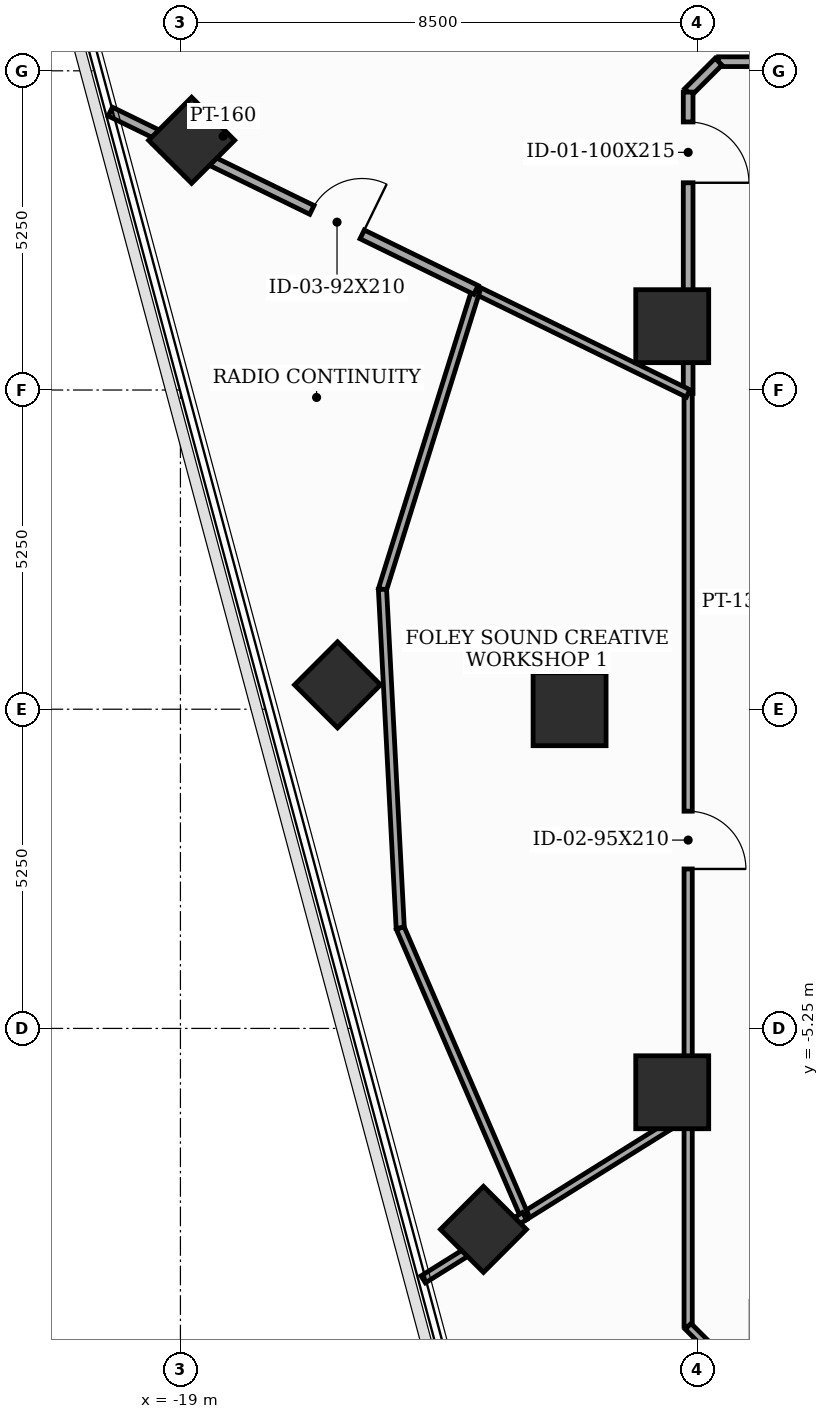
"""IFC4 building model, lengths in metres.
Left out: names, types, materials, properties, quantities, classifications, styles, units other than length and angle.
Written with IfcOpenShell. Run it as: python <this file> out.ifc"""

import sys

from ifc_helpers import new_model, si_unit, direction, frame, frame_2d, origin, origin_2d, place, context, subcontext, project, spatial, rectangle, extrude, element, fill, save


model = new_model("IFC4")
c1 = context("Model", 3, precision=1e-05, world=origin(), true_north=direction((0.0, 1.0)))
c2 = subcontext(c1, "Body", "Model", "MODEL_VIEW")
j1 = project(units=[si_unit("LENGTHUNIT", "METRE"), si_unit("PLANEANGLEUNIT", "RADIAN")], contexts=[c1])
p1 = place(None, origin())
s1 = spatial("IfcSite", under=j1, at=p1, CompositionType="ELEMENT")
p2 = place(p1, origin())
s2 = spatial("IfcBuilding", under=s1, at=p2, CompositionType="ELEMENT")
p3 = place(p2, frame((0.0, 0.0, 187.9)))
s3 = spatial("IfcBuildingStorey", under=s2, at=p3, CompositionType="ELEMENT", Elevation=187.9)
for number, where, z_axis, x_axis in (
    (1, (-10.912, 6.3, 0.0), (0.0, 0.0, 1.0), (1.0, 0.0, 0.0)),
    (2, (-12.6, 0.0, 0.0), (0.0, 0.0, 1.0), (1.0, 0.0, 0.0)),
    (3, (-10.912, -6.3, 0.0), (0.0, 0.0, 1.0), (1.0, 0.0, 0.0)),
):
    element("IfcColumn", number, at=place(p3, frame(where, z_axis=z_axis, x_axis=x_axis)), inside=s3, PredefinedType="COLUMN", context=c2, shape_type="SweptSolid", body=[
        extrude(rectangle(XDim=1.2, YDim=1.2, at=origin_2d()), origin(), (0.0, 0.0, 1.0), 3.7),
    ])
for number, where, z_axis, x_axis in (
    (4, (-18.816, 9.357, 0.0), (0.0, 0.0, 1.0), (0.707, 0.707, 0.0)),
    (5, (-16.416, 0.401, 0.0), (0.0, 0.0, 1.0), (0.707, 0.707, 0.0)),
    (6, (-14.016, -8.555, 0.0), (0.0, 0.0, 1.0), (0.707, 0.707, 0.0)),
):
    element("IfcColumn", number, at=place(p3, frame(where, z_axis=z_axis, x_axis=x_axis)), inside=s3, PredefinedType="COLUMN", context=c2, shape_type="SweptSolid", body=[
        extrude(rectangle(XDim=1.0, YDim=1.0, at=origin_2d()), origin(), (0.0, 0.0, 1.0), 3.7),
    ])
p4 = place(p3, frame((-10.65, 5.194, 0.0), z_axis=(0.0, 0.0, 1.0), x_axis=(0.0, -1.0, 0.0)))
e7 = element("IfcWall", 7, at=p4, inside=s3, PredefinedType="PARTITIONING", context=c2, shape_type="SweptSolid", body=[
    extrude(rectangle(XDim=11.849, YDim=0.135, at=frame_2d((5.925, 0.0))), origin(), (0.0, 0.0, 1.0), 2.885),
])
p5 = place(p4, frame((6.871, 0.0, 0.0)))
e8 = element("IfcOpeningElement", 8, at=p5, cuts=e7, PredefinedType="OPENING", context=c2, shape_type="SweptSolid", body=[
    extrude(rectangle(XDim=0.95, YDim=2.1, at=frame_2d((0.475, 1.05))), frame((0.0, 0.077, 0.0), z_axis=(0.0, -1.0, 0.0), x_axis=(1.0, 0.0, 0.0)), (0.0, 0.0, 1.0), 0.155),
])
p6 = place(p3, frame((-10.65, -6.655, 0.0), z_axis=(0.0, 0.0, 1.0), x_axis=(0.0, -1.0, 0.0)))
e9 = element("IfcWall", 9, at=p6, inside=s3, PredefinedType="PARTITIONING", context=c2, shape_type="SweptSolid", body=[
    extrude(rectangle(XDim=3.495, YDim=0.135, at=frame_2d((1.748, 0.0))), origin(), (0.0, 0.0, 1.0), 2.885),
])
p7 = place(p3, frame((-10.65, -10.15, 0.0), z_axis=(0.0, 0.0, 1.0), x_axis=(0.707106781187, -0.707106781187, 0.0)))
e10 = element("IfcWall", 10, at=p7, inside=s3, PredefinedType="PARTITIONING", context=c2, shape_type="SweptSolid", body=[
    extrude(rectangle(XDim=0.707, YDim=0.135, at=frame_2d((0.354, 0.0))), origin(), (0.0, 0.0, 1.0), 3.5),
])
p8 = place(p3, frame((-2.264, 10.65, 0.0), z_axis=(0.0, 0.0, 1.0), x_axis=(-1.0, 0.0, 0.0)))
e11 = element("IfcWall", 11, at=p8, inside=s3, PredefinedType="PARTITIONING", context=c2, shape_type="SweptSolid", body=[
    extrude(rectangle(XDim=7.886, YDim=0.16, at=frame_2d((3.943, 0.0))), origin(), (0.0, 0.0, 1.0), 2.885),
])
p9 = place(p3, frame((-10.15, 10.65, 0.0), z_axis=(0.0, 0.0, 1.0), x_axis=(-0.707106781187, -0.707106781187, 0.0)))
e12 = element("IfcWall", 12, at=p9, inside=s3, PredefinedType="PARTITIONING", context=c2, shape_type="SweptSolid", body=[
    extrude(rectangle(XDim=0.707, YDim=0.16, at=frame_2d((0.354, 0.0))), origin(), (0.0, 0.0, 1.0), 3.5),
])
p10 = place(p3, frame((-10.65, 10.15, 0.0), z_axis=(0.0, 0.0, 1.0), x_axis=(0.0, -1.0, 0.0)))
e13 = element("IfcWall", 13, at=p10, inside=s3, PredefinedType="PARTITIONING", context=c2, shape_type="SweptSolid", body=[
    extrude(rectangle(XDim=4.956, YDim=0.16, at=frame_2d((2.478, 0.0))), origin(), (0.0, 0.0, 1.0), 2.885),
])
p11 = place(p10, frame((0.491, 0.0, 0.0)))
e14 = element("IfcOpeningElement", 14, at=p11, cuts=e13, PredefinedType="OPENING", context=c2, shape_type="SweptSolid", body=[
    extrude(rectangle(XDim=1.0, YDim=2.15, at=frame_2d((0.5, 1.075))), frame((0.0, 0.09, 0.0), z_axis=(0.0, -1.0, 0.0), x_axis=(1.0, 0.0, 0.0)), (0.0, 0.0, 1.0), 0.18),
])
p12 = place(p3, frame((-13.341, -8.336, 0.0), z_axis=(0.0, 0.0, 1.0), x_axis=(0.848149563096, 0.529756848582, 0.0)))
e15 = element("IfcWall", 15, at=p12, inside=s3, PredefinedType="PARTITIONING", context=c2, shape_type="SweptSolid", body=[
    extrude(rectangle(XDim=3.173, YDim=0.135, at=frame_2d((1.586, 0.0))), origin(), (0.0, 0.0, 1.0), 2.885),
])
p13 = place(p3, frame((-10.65, 5.194, 0.0), z_axis=(0.0, 0.0, 1.0), x_axis=(-0.898773885441, 0.438412480261, 0.0)))
e16 = element("IfcWall", 16, at=p13, inside=s3, PredefinedType="PARTITIONING", context=c2, shape_type="SweptSolid", body=[
    extrude(rectangle(XDim=3.882, YDim=0.135, at=frame_2d((1.941, 0.0))), origin(), (0.0, 0.0, 1.0), 2.885),
])
p14 = place(p3, frame((-14.139, 6.896, 0.0), z_axis=(0.0, 0.0, 1.0), x_axis=(-0.298099863076, -0.954534688544, 0.0)))
e17 = element("IfcWall", 17, at=p14, inside=s3, PredefinedType="PARTITIONING", context=c2, shape_type="SweptSolid", body=[
    extrude(rectangle(XDim=5.16, YDim=0.135, at=frame_2d((2.58, 0.0))), origin(), (0.0, 0.0, 1.0), 3.5),
])
p15 = place(p3, frame((-15.677, 1.971, 0.0), z_axis=(0.0, 0.0, 1.0), x_axis=(0.052349772407, -0.998628810584, 0.0)))
e18 = element("IfcWall", 18, at=p15, inside=s3, PredefinedType="PARTITIONING", context=c2, shape_type="SweptSolid", body=[
    extrude(rectangle(XDim=5.578, YDim=0.135, at=frame_2d((2.789, 0.0))), origin(), (0.0, 0.0, 1.0), 2.985),
])
p16 = place(p3, frame((-15.385, -3.599, 0.0), z_axis=(0.0, 0.0, 1.0), x_axis=(0.396191247476, -0.918168010455, 0.0)))
e19 = element("IfcWall", 19, at=p16, inside=s3, PredefinedType="PARTITIONING", context=c2, shape_type="SweptSolid", body=[
    extrude(rectangle(XDim=5.159, YDim=0.135, at=frame_2d((2.58, 0.0))), origin(), (0.0, 0.0, 1.0), 2.985),
])
p17 = place(p3, frame((-13.341, -8.336, 0.0), z_axis=(0.0, 0.0, 1.0), x_axis=(-0.848033204961, -0.529943094382, 0.0)))
e20 = element("IfcWall", 20, at=p17, inside=s3, PredefinedType="PARTITIONING", context=c2, shape_type="SweptSolid", body=[
    extrude(rectangle(XDim=1.965, YDim=0.135, at=frame_2d((0.982, 0.0))), origin(), (0.0, 0.0, 1.0), 2.985),
])
p18 = place(p3, frame((-20.154, 9.829, 0.0), z_axis=(0.0, 0.0, 1.0), x_axis=(0.898812268895, -0.43833378296, 0.0)))
e21 = element("IfcWall", 21, at=p18, inside=s3, PredefinedType="PARTITIONING", context=c2, shape_type="SweptSolid", body=[
    extrude(rectangle(XDim=6.692, YDim=0.16, at=frame_2d((3.346, 0.0))), origin(), (0.0, 0.0, 1.0), 2.985),
])
p19 = place(p18, frame((3.689, 0.0, 0.0)))
e22 = element("IfcOpeningElement", 22, at=p19, cuts=e21, PredefinedType="OPENING", context=c2, shape_type="SweptSolid", body=[
    extrude(rectangle(XDim=0.92, YDim=2.1, at=frame_2d((0.46, 1.05))), frame((0.0, 0.09, 0.0), z_axis=(0.0, -1.0, 0.0), x_axis=(1.0, 0.0, 0.0)), (0.0, 0.0, 1.0), 0.18),
])
p20 = place(p5, origin())
e23 = element("IfcDoor", 23, at=p20, inside=s3, OperationType="SINGLE_SWING_RIGHT", PredefinedType="DOOR", context=c2, shape_type="SweptSolid", body=[
    extrude(rectangle(XDim=0.95, YDim=2.1, at=frame_2d((0.475, 1.05))), frame((0.0, 0.025, 0.0), z_axis=(0.0, -1.0, 0.0), x_axis=(1.0, 0.0, 0.0)), (0.0, 0.0, 1.0), 0.05),
])
fill(e8, e23)
p21 = place(p11, origin())
e24 = element("IfcDoor", 24, at=p21, inside=s3, OperationType="SINGLE_SWING_RIGHT", PredefinedType="DOOR", context=c2, shape_type="SweptSolid", body=[
    extrude(rectangle(XDim=1.0, YDim=2.15, at=frame_2d((0.5, 1.075))), frame((0.0, 0.025, 0.0), z_axis=(0.0, -1.0, 0.0), x_axis=(1.0, 0.0, 0.0)), (0.0, 0.0, 1.0), 0.05),
])
fill(e14, e24)
p22 = place(p19, origin())
e25 = element("IfcDoor", 25, at=p22, inside=s3, OperationType="SINGLE_SWING_RIGHT", PredefinedType="DOOR", context=c2, shape_type="SweptSolid", body=[
    extrude(rectangle(XDim=0.92, YDim=2.1, at=frame_2d((0.46, 1.05))), frame((0.0, 0.025, 0.0), z_axis=(0.0, -1.0, 0.0), x_axis=(1.0, 0.0, 0.0)), (0.0, 0.0, 1.0), 0.05),
])
fill(e22, e25)
save(model, sys.argv[1])
